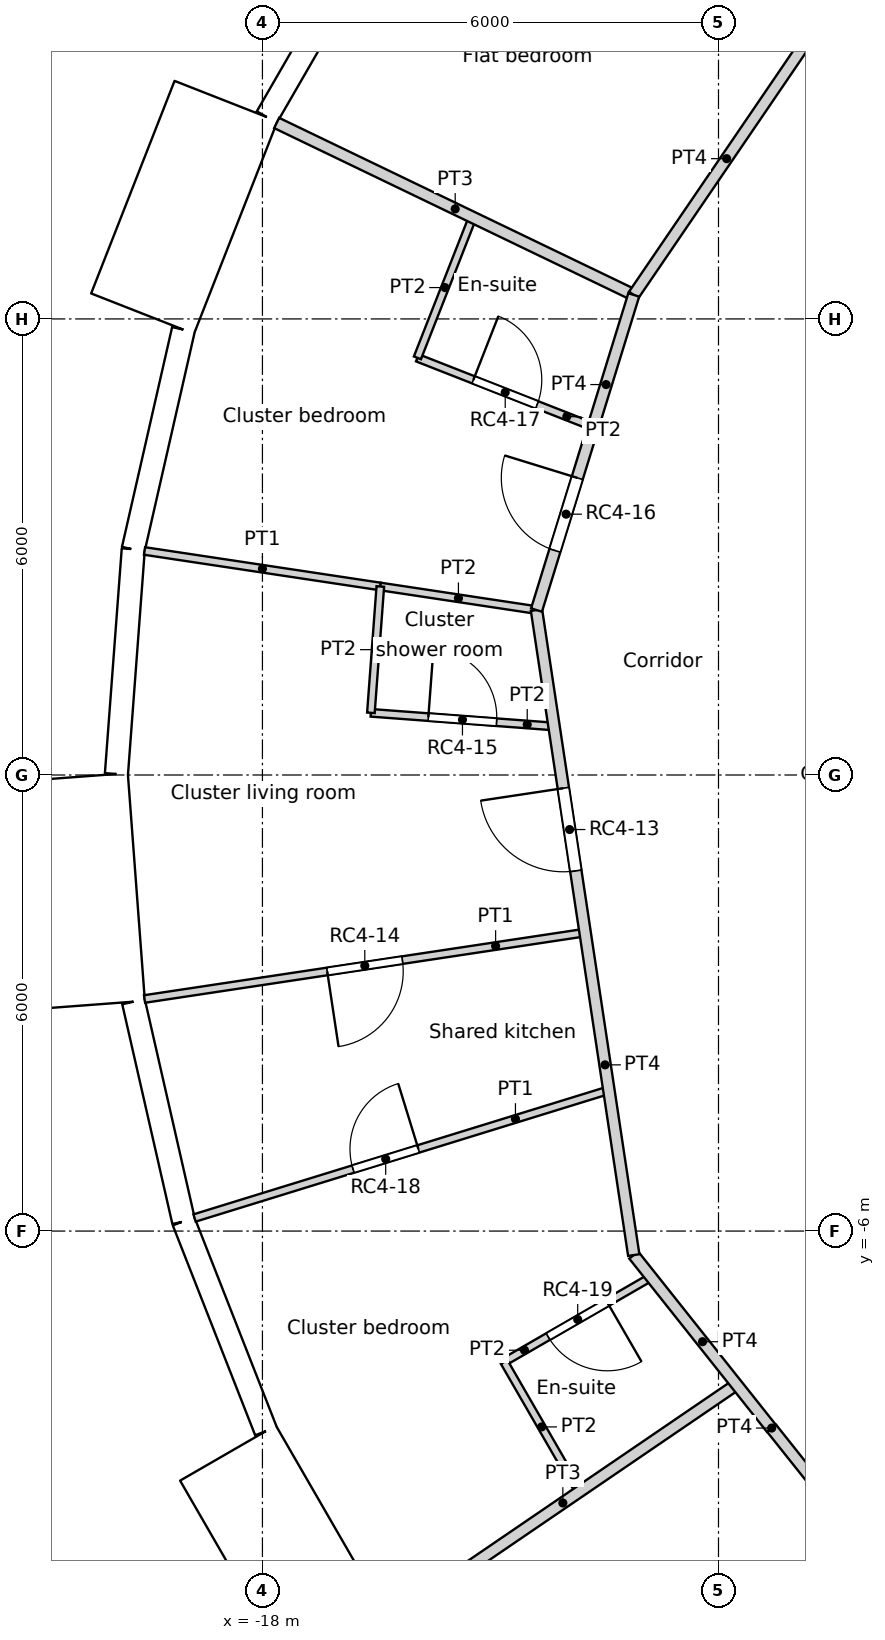
"""IFC4 building model, lengths in metres.
Left out: names, types, materials, properties, quantities, classifications, styles, units other than length and angle.
Written with IfcOpenShell. Run it as: python <this file> out.ifc"""

import sys

from ifc_helpers import new_model, si_unit, direction, frame, frame_2d, origin, origin_2d, place, context, subcontext, project, spatial, rectangle, circle, extrude, element, fill, save


model = new_model("IFC4")
c1 = context("Model", 3, precision=1e-05, world=origin(), true_north=direction((0.0, 1.0)))
c2 = subcontext(c1, "Body", "Model", "MODEL_VIEW")
j1 = project(units=[si_unit("LENGTHUNIT", "METRE"), si_unit("PLANEANGLEUNIT", "RADIAN")], contexts=[c1])
p1 = place(None, origin())
s1 = spatial("IfcSite", under=j1, at=p1, CompositionType="ELEMENT")
p2 = place(p1, origin())
s2 = spatial("IfcBuilding", under=s1, at=p2, CompositionType="ELEMENT")
p3 = place(p2, frame((0.0, 0.0, 263.4)))
s3 = spatial("IfcBuildingStorey", under=s2, at=p3, CompositionType="ELEMENT", Elevation=263.4)
for number, where, z_axis, x_axis in (
    (1, (-16.958, 8.167, 0.0), (0.0, 0.0, 1.0), (1.0, 0.0, 0.0)),
    (2, (-18.612, 2.805, 0.0), (0.0, 0.0, 1.0), (1.0, 0.0, 0.0)),
    (3, (-18.612, -2.805, 0.0), (0.0, 0.0, 1.0), (1.0, 0.0, 0.0)),
    (4, (-16.958, -8.167, 0.0), (0.0, 0.0, 1.0), (1.0, 0.0, 0.0)),
):
    element("IfcColumn", number, at=place(p3, frame(where, z_axis=z_axis, x_axis=x_axis)), inside=s3, PredefinedType="COLUMN", context=c2, shape_type="SweptSolid", body=[
        extrude(circle(Radius=0.55, at=origin_2d()), origin(), (0.0, 0.0, 1.0), 3.6),
    ])
p4 = place(p3, frame((-16.46, 11.222, 0.0), z_axis=(0.0, 0.0, 1.0), x_axis=(-0.499950756475, -0.86605383268, 0.0)))
e5 = element("IfcWall", 5, at=p4, inside=s3, PredefinedType="SOLIDWALL", context=c2, shape_type="SweptSolid", body=[
    extrude(rectangle(XDim=2.962, YDim=0.3, at=frame_2d((1.481, 0.0))), origin(), (0.0, 0.0, 1.0), 3.25),
])
p5 = place(p4, frame((1.481, 0.0, 1.55)))
e6 = element("IfcOpeningElement", 6, at=p5, cuts=e5, PredefinedType="OPENING", context=c2, shape_type="SweptSolid", body=[
    extrude(circle(Radius=0.9, at=origin_2d()), frame((0.0, 0.16, 0.0), z_axis=(0.0, -1.0, 0.0), x_axis=(1.0, 0.0, 0.0)), (0.0, 0.0, 1.0), 0.32),
])
p6 = place(p3, frame((-18.48, 8.864, -0.35), z_axis=(0.0, 0.0, 1.0), x_axis=(-0.36537792632, -0.93085926485, 0.0)))
e7 = element("IfcWall", 7, at=p6, inside=s3, PredefinedType="ELEMENTEDWALL", context=c2, shape_type="SweptSolid", body=[
    extrude(rectangle(XDim=3.0, YDim=1.45, at=frame_2d((1.5, 0.0))), origin(), (0.0, 0.0, 1.0), 3.6),
])
p7 = place(p6, frame((1.5, 0.0, 1.9)))
e8 = element("IfcOpeningElement", 8, at=p7, cuts=e7, PredefinedType="OPENING", context=c2, shape_type="SweptSolid", body=[
    extrude(circle(Radius=0.9, at=origin_2d()), frame((0.0, 0.735, 0.0), z_axis=(0.0, -1.0, 0.0), x_axis=(1.0, 0.0, 0.0)), (0.0, 0.0, 1.0), 1.47),
])
p8 = place(p3, frame((-19.04, 5.857, 0.0), z_axis=(0.0, 0.0, 1.0), x_axis=(-0.222529389789, -0.974925982155, 0.0)))
e9 = element("IfcWall", 9, at=p8, inside=s3, PredefinedType="SOLIDWALL", context=c2, shape_type="SweptSolid", body=[
    extrude(rectangle(XDim=2.962, YDim=0.3, at=frame_2d((1.481, 0.0))), origin(), (0.0, 0.0, 1.0), 3.25),
])
p9 = place(p8, frame((1.481, 0.0, 1.55)))
e10 = element("IfcOpeningElement", 10, at=p9, cuts=e9, PredefinedType="OPENING", context=c2, shape_type="SweptSolid", body=[
    extrude(circle(Radius=0.9, at=origin_2d()), frame((0.0, 0.16, 0.0), z_axis=(0.0, -1.0, 0.0), x_axis=(1.0, 0.0, 0.0)), (0.0, 0.0, 1.0), 0.32),
])
p10 = place(p3, frame((-19.699, 2.969, 0.0), z_axis=(0.0, 0.0, 1.0), x_axis=(-0.07474897196, -0.997202382263, 0.0)))
e11 = element("IfcWall", 11, at=p10, inside=s3, PredefinedType="SOLIDWALL", context=c2, shape_type="SweptSolid", body=[
    extrude(rectangle(XDim=2.962, YDim=0.3, at=frame_2d((1.481, 0.0))), origin(), (0.0, 0.0, 1.0), 3.25),
])
p11 = place(p10, frame((1.481, 0.0, 1.55)))
e12 = element("IfcOpeningElement", 12, at=p11, cuts=e11, PredefinedType="OPENING", context=c2, shape_type="SweptSolid", body=[
    extrude(circle(Radius=0.9, at=origin_2d()), frame((0.0, 0.16, 0.0), z_axis=(0.0, -1.0, 0.0), x_axis=(1.0, 0.0, 0.0)), (0.0, 0.0, 1.0), 0.32),
])
p12 = place(p3, frame((-20.496, -0.032, -0.35), z_axis=(0.0, 0.0, 1.0), x_axis=(0.074785902127, -0.997199613339, 0.0)))
e13 = element("IfcWall", 13, at=p12, inside=s3, PredefinedType="ELEMENTEDWALL", context=c2, shape_type="SweptSolid", body=[
    extrude(rectangle(XDim=3.0, YDim=1.45, at=frame_2d((1.5, 0.0))), origin(), (0.0, 0.0, 1.0), 3.6),
])
p13 = place(p12, frame((1.5, 0.0, 1.9)))
e14 = element("IfcOpeningElement", 14, at=p13, cuts=e13, PredefinedType="OPENING", context=c2, shape_type="SweptSolid", body=[
    extrude(circle(Radius=0.9, at=origin_2d()), frame((0.0, 0.735, 0.0), z_axis=(0.0, -1.0, 0.0), x_axis=(1.0, 0.0, 0.0)), (0.0, 0.0, 1.0), 1.47),
])
p14 = place(p3, frame((-19.696, -2.984, 0.0), z_axis=(0.0, 0.0, 1.0), x_axis=(0.222529389789, -0.974925982155, 0.0)))
e15 = element("IfcWall", 15, at=p14, inside=s3, PredefinedType="SOLIDWALL", context=c2, shape_type="SweptSolid", body=[
    extrude(rectangle(XDim=2.962, YDim=0.3, at=frame_2d((1.481, 0.0))), origin(), (0.0, 0.0, 1.0), 3.25),
])
p15 = place(p14, frame((1.481, 0.0, 1.55)))
e16 = element("IfcOpeningElement", 16, at=p15, cuts=e15, PredefinedType="OPENING", context=c2, shape_type="SweptSolid", body=[
    extrude(circle(Radius=0.9, at=origin_2d()), frame((0.0, 0.16, 0.0), z_axis=(0.0, -1.0, 0.0), x_axis=(1.0, 0.0, 0.0)), (0.0, 0.0, 1.0), 0.32),
])
p16 = place(p3, frame((-19.037, -5.872, 0.0), z_axis=(0.0, 0.0, 1.0), x_axis=(0.36530043032, -0.930889679612, 0.0)))
e17 = element("IfcWall", 17, at=p16, inside=s3, PredefinedType="SOLIDWALL", context=c2, shape_type="SweptSolid", body=[
    extrude(rectangle(XDim=2.962, YDim=0.3, at=frame_2d((1.481, 0.0))), origin(), (0.0, 0.0, 1.0), 3.25),
])
p17 = place(p16, frame((1.481, 0.0, 1.55)))
e18 = element("IfcOpeningElement", 18, at=p17, cuts=e17, PredefinedType="OPENING", context=c2, shape_type="SweptSolid", body=[
    extrude(circle(Radius=0.9, at=origin_2d()), frame((0.0, 0.16, 0.0), z_axis=(0.0, -1.0, 0.0), x_axis=(1.0, 0.0, 0.0)), (0.0, 0.0, 1.0), 0.32),
])
p18 = place(p3, frame((-18.452, -8.921, -0.35), z_axis=(0.0, 0.0, 1.0), x_axis=(0.499990139034, -0.866031096941, 0.0)))
e19 = element("IfcWall", 19, at=p18, inside=s3, PredefinedType="ELEMENTEDWALL", context=c2, shape_type="SweptSolid", body=[
    extrude(rectangle(XDim=3.0, YDim=1.45, at=frame_2d((1.5, 0.0))), origin(), (0.0, 0.0, 1.0), 3.6),
])
p19 = place(p18, frame((1.5, 0.0, 1.9)))
e20 = element("IfcOpeningElement", 20, at=p19, cuts=e19, PredefinedType="OPENING", context=c2, shape_type="SweptSolid", body=[
    extrude(circle(Radius=0.9, at=origin_2d()), frame((0.0, 0.735, 0.0), z_axis=(0.0, -1.0, 0.0), x_axis=(1.0, 0.0, 0.0)), (0.0, 0.0, 1.0), 1.47),
])
p20 = place(p3, frame((-11.3, -8.596, 0.0), z_axis=(0.0, 0.0, 1.0), x_axis=(0.623165080354, -0.782090328944, 0.0)))
e21 = element("IfcWall", 21, at=p20, inside=s3, PredefinedType="PARTITIONING", context=c2, shape_type="SweptSolid", body=[
    extrude(rectangle(XDim=3.564, YDim=0.15, at=frame_2d((1.782, 0.0))), origin(), (0.0, 0.0, 1.0), 3.25),
])
p21 = place(p3, frame((-11.3, -8.596, 0.0), z_axis=(0.0, 0.0, 1.0), x_axis=(0.0, 1.0, 0.0)))
e22 = element("IfcWall", 22, at=p21, inside=s3, PredefinedType="PARTITIONING", context=c2, shape_type="SweptSolid", body=[
    extrude(rectangle(XDim=0.009, YDim=0.15, at=frame_2d((0.005, 0.0))), origin(), (0.0, 0.0, 1.0), 3.25),
])
p22 = place(p3, frame((-13.115, 6.316, 0.0), z_axis=(0.0, 0.0, 1.0), x_axis=(0.563305396331, 0.826248770325, 0.0)))
e23 = element("IfcWall", 23, at=p22, inside=s3, PredefinedType="PARTITIONING", context=c2, shape_type="SweptSolid", body=[
    extrude(rectangle(XDim=4.339, YDim=0.15, at=frame_2d((2.169, 0.0))), origin(), (0.0, 0.0, 1.0), 3.25),
])
p23 = place(p3, frame((-14.394, 2.17, 0.0), z_axis=(0.0, 0.0, 1.0), x_axis=(0.149099970299, -0.988822127006, 0.0)))
e24 = element("IfcWall", 24, at=p23, inside=s3, PredefinedType="PARTITIONING", context=c2, shape_type="SweptSolid", body=[
    extrude(rectangle(XDim=8.582, YDim=0.15, at=frame_2d((4.291, 0.0))), origin(), (0.0, 0.0, 1.0), 3.25),
])
p24 = place(p23, frame((2.37, 0.0, 0.0)))
e25 = element("IfcOpeningElement", 25, at=p24, cuts=e24, PredefinedType="OPENING", context=c2, shape_type="SweptSolid", body=[
    extrude(rectangle(XDim=1.1, YDim=2.1, at=frame_2d((0.55, 1.05))), frame((0.0, 0.075, 0.0), z_axis=(0.0, -1.0, 0.0), x_axis=(1.0, 0.0, 0.0)), (0.0, 0.0, 1.0), 0.15),
])
p25 = place(p3, frame((-14.394, 2.17, 0.0), z_axis=(0.0, 0.0, 1.0), x_axis=(0.294793541578, 0.955560970239, 0.0)))
e26 = element("IfcWall", 26, at=p25, inside=s3, PredefinedType="PARTITIONING", context=c2, shape_type="SweptSolid", body=[
    extrude(rectangle(XDim=4.339, YDim=0.15, at=frame_2d((2.169, 0.0))), origin(), (0.0, 0.0, 1.0), 3.25),
])
p26 = place(p25, frame((0.82, 0.0, 0.0)))
e27 = element("IfcOpeningElement", 27, at=p26, cuts=e26, PredefinedType="OPENING", context=c2, shape_type="SweptSolid", body=[
    extrude(rectangle(XDim=1.0, YDim=2.1, at=frame_2d((0.5, 1.05))), frame((0.0, 0.075, 0.0), z_axis=(0.0, -1.0, 0.0), x_axis=(1.0, 0.0, 0.0)), (0.0, 0.0, 1.0), 0.15),
])
p27 = place(p3, frame((-13.115, -6.316, 0.0), z_axis=(0.0, 0.0, 1.0), x_axis=(0.622042479172, -0.782983495423, 0.0)))
e28 = element("IfcWall", 28, at=p27, inside=s3, PredefinedType="PARTITIONING", context=c2, shape_type="SweptSolid", body=[
    extrude(rectangle(XDim=2.911, YDim=0.15, at=frame_2d((1.456, 0.0))), origin(), (0.0, 0.0, 1.0), 3.25),
])
p28 = place(p3, frame((-17.813, 8.578, 0.0), z_axis=(0.0, 0.0, 1.0), x_axis=(0.901040981828, -0.433733961164, 0.0)))
e29 = element("IfcWall", 29, at=p28, inside=s3, PredefinedType="PARTITIONING", context=c2, shape_type="SweptSolid", body=[
    extrude(rectangle(XDim=5.214, YDim=0.15, at=frame_2d((2.607, 0.0))), origin(), (0.0, 0.0, 1.0), 3.25),
])
p29 = place(p3, frame((-19.551, -2.947, 0.0), z_axis=(0.0, 0.0, 1.0), x_axis=(0.988820879867, 0.149108241014, 0.0)))
e30 = element("IfcWall", 30, at=p29, inside=s3, PredefinedType="PARTITIONING", context=c2, shape_type="SweptSolid", body=[
    extrude(rectangle(XDim=5.862, YDim=0.1, at=frame_2d((2.931, 0.0))), origin(), (0.0, 0.0, 1.0), 3.25),
])
p30 = place(p29, frame((2.43, 0.0, 0.0)))
e31 = element("IfcOpeningElement", 31, at=p30, cuts=e30, PredefinedType="OPENING", context=c2, shape_type="SweptSolid", body=[
    extrude(rectangle(XDim=1.0, YDim=2.04, at=frame_2d((0.5, 1.02))), frame((0.0, 0.05, 0.0), z_axis=(0.0, -1.0, 0.0), x_axis=(1.0, 0.0, 0.0)), (0.0, 0.0, 1.0), 0.1),
])
p31 = place(p3, frame((-16.573, 0.818, 0.0), z_axis=(0.0, 0.0, 1.0), x_axis=(0.074422099282, 0.997226830334, 0.0)))
e32 = element("IfcWall", 32, at=p31, inside=s3, PredefinedType="PARTITIONING", context=c2, shape_type="SweptSolid", body=[
    extrude(rectangle(XDim=1.667, YDim=0.1, at=frame_2d((0.833, 0.0))), origin(), (0.0, 0.0, 1.0), 3.25),
])
p32 = place(p3, frame((-16.573, 0.818, 0.0), z_axis=(0.0, 0.0, 1.0), x_axis=(0.997216800215, -0.074556377121, 0.0)))
e33 = element("IfcWall", 33, at=p32, inside=s3, PredefinedType="PARTITIONING", context=c2, shape_type="SweptSolid", body=[
    extrude(rectangle(XDim=2.417, YDim=0.1, at=frame_2d((1.208, 0.0))), origin(), (0.0, 0.0, 1.0), 3.25),
])
p33 = place(p32, frame((0.758, 0.0, 0.0)))
e34 = element("IfcOpeningElement", 34, at=p33, cuts=e33, PredefinedType="OPENING", context=c2, shape_type="SweptSolid", body=[
    extrude(rectangle(XDim=0.9, YDim=2.0, at=frame_2d((0.45, 1.0))), frame((0.0, 0.05, 0.0), z_axis=(0.0, -1.0, 0.0), x_axis=(1.0, 0.0, 0.0)), (0.0, 0.0, 1.0), 0.1),
])
p34 = place(p3, frame((-19.551, 2.947, 0.0), z_axis=(0.0, 0.0, 1.0), x_axis=(0.98885514456, -0.14888083516, 0.0)))
e35 = element("IfcWall", 35, at=p34, inside=s3, PredefinedType="PARTITIONING", context=c2, shape_type="SweptSolid", body=[
    extrude(rectangle(XDim=3.137, YDim=0.1, at=frame_2d((1.568, 0.0))), origin(), (0.0, 0.0, 1.0), 3.25),
])
p35 = place(p3, frame((-18.893, -5.828, 0.0), z_axis=(0.0, 0.0, 1.0), x_axis=(0.955552020905, 0.294822548908, 0.0)))
e36 = element("IfcWall", 36, at=p35, inside=s3, PredefinedType="PARTITIONING", context=c2, shape_type="SweptSolid", body=[
    extrude(rectangle(XDim=5.705, YDim=0.1, at=frame_2d((2.853, 0.0))), origin(), (0.0, 0.0, 1.0), 3.25),
])
p36 = place(p35, frame((2.182, 0.0, 0.0)))
e37 = element("IfcOpeningElement", 37, at=p36, cuts=e36, PredefinedType="OPENING", context=c2, shape_type="SweptSolid", body=[
    extrude(rectangle(XDim=0.9, YDim=2.1, at=frame_2d((0.45, 1.05))), frame((0.0, 0.05, 0.0), z_axis=(0.0, -1.0, 0.0), x_axis=(1.0, 0.0, 0.0)), (0.0, 0.0, 1.0), 0.1),
])
p37 = place(p3, frame((-16.449, 2.48, 0.0), z_axis=(0.0, 0.0, 1.0), x_axis=(0.988807590235, -0.149196345444, 0.0)))
e38 = element("IfcWall", 38, at=p37, inside=s3, PredefinedType="PARTITIONING", context=c2, shape_type="SweptSolid", body=[
    extrude(rectangle(XDim=2.078, YDim=0.1, at=frame_2d((1.039, 0.0))), origin(), (0.0, 0.0, 1.0), 3.25),
])
p38 = place(p3, frame((-15.961, 5.488, 0.0), z_axis=(0.0, 0.0, 1.0), x_axis=(0.365427989951, 0.930839612479, 0.0)))
e39 = element("IfcWall", 39, at=p38, inside=s3, PredefinedType="PARTITIONING", context=c2, shape_type="SweptSolid", body=[
    extrude(rectangle(XDim=1.986, YDim=0.1, at=frame_2d((0.993, 0.0))), origin(), (0.0, 0.0, 1.0), 3.25),
])
p39 = place(p3, frame((-15.961, 5.488, 0.0), z_axis=(0.0, 0.0, 1.0), x_axis=(0.930878137474, -0.365329841614, 0.0)))
e40 = element("IfcWall", 40, at=p39, inside=s3, PredefinedType="PARTITIONING", context=c2, shape_type="SweptSolid", body=[
    extrude(rectangle(XDim=2.483, YDim=0.1, at=frame_2d((1.241, 0.0))), origin(), (0.0, 0.0, 1.0), 3.25),
])
p40 = place(p39, frame((0.791, 0.0, 0.0)))
e41 = element("IfcOpeningElement", 41, at=p40, cuts=e40, PredefinedType="OPENING", context=c2, shape_type="SweptSolid", body=[
    extrude(rectangle(XDim=0.9, YDim=2.04, at=frame_2d((0.45, 1.02))), frame((0.0, 0.05, 0.0), z_axis=(0.0, -1.0, 0.0), x_axis=(1.0, 0.0, 0.0)), (0.0, 0.0, 1.0), 0.1),
])
p41 = place(p3, frame((-14.82, -7.722, 0.0), z_axis=(0.0, 0.0, 1.0), x_axis=(0.866076416361, 0.499911633214, 0.0)))
e42 = element("IfcWall", 42, at=p41, inside=s3, PredefinedType="PARTITIONING", context=c2, shape_type="SweptSolid", body=[
    extrude(rectangle(XDim=2.234, YDim=0.1, at=frame_2d((1.117, 0.0))), origin(), (0.0, 0.0, 1.0), 3.25),
])
p42 = place(p41, frame((0.667, 0.0, 0.0)))
e43 = element("IfcOpeningElement", 43, at=p42, cuts=e42, PredefinedType="OPENING", context=c2, shape_type="SweptSolid", body=[
    extrude(rectangle(XDim=0.9, YDim=2.04, at=frame_2d((0.45, 1.02))), frame((0.0, 0.05, 0.0), z_axis=(0.0, -1.0, 0.0), x_axis=(1.0, 0.0, 0.0)), (0.0, 0.0, 1.0), 0.1),
])
p43 = place(p3, frame((-14.82, -7.722, 0.0), z_axis=(0.0, 0.0, 1.0), x_axis=(0.500143626598, -0.865942465048, 0.0)))
e44 = element("IfcWall", 44, at=p43, inside=s3, PredefinedType="PARTITIONING", context=c2, shape_type="SweptSolid", body=[
    extrude(rectangle(XDim=1.974, YDim=0.1, at=frame_2d((0.987, 0.0))), origin(), (0.0, 0.0, 1.0), 3.25),
])
p44 = place(p3, frame((-16.336, -11.138, 0.0), z_axis=(0.0, 0.0, 1.0), x_axis=(0.82615274451, 0.563446219917, 0.0)))
e45 = element("IfcWall", 45, at=p44, inside=s3, PredefinedType="PARTITIONING", context=c2, shape_type="SweptSolid", body=[
    extrude(rectangle(XDim=5.54, YDim=0.15, at=frame_2d((2.77, 0.0))), origin(), (0.0, 0.0, 1.0), 3.25),
])
p45 = place(p5, origin())
e46 = element("IfcWindow", 46, at=p45, inside=s3, PartitioningType="SINGLE_PANEL", PredefinedType="WINDOW", context=c2, shape_type="SweptSolid", body=[
    extrude(circle(Radius=0.9, at=origin_2d()), frame((0.0, 0.12, 0.0), z_axis=(0.0, -1.0, 0.0), x_axis=(1.0, 0.0, 0.0)), (0.0, 0.0, 1.0), 0.1),
])
fill(e6, e46)
p46 = place(p7, origin())
e47 = element("IfcWindow", 47, at=p46, inside=s3, PartitioningType="SINGLE_PANEL", PredefinedType="WINDOW", context=c2, shape_type="SweptSolid", body=[
    extrude(circle(Radius=0.9, at=origin_2d()), frame((0.0, 0.695, 0.0), z_axis=(0.0, -1.0, 0.0), x_axis=(1.0, 0.0, 0.0)), (0.0, 0.0, 1.0), 0.1),
])
fill(e8, e47)
p47 = place(p9, origin())
e48 = element("IfcWindow", 48, at=p47, inside=s3, PartitioningType="SINGLE_PANEL", PredefinedType="WINDOW", context=c2, shape_type="SweptSolid", body=[
    extrude(circle(Radius=0.9, at=origin_2d()), frame((0.0, 0.12, 0.0), z_axis=(0.0, -1.0, 0.0), x_axis=(1.0, 0.0, 0.0)), (0.0, 0.0, 1.0), 0.1),
])
fill(e10, e48)
p48 = place(p11, origin())
e49 = element("IfcWindow", 49, at=p48, inside=s3, PartitioningType="SINGLE_PANEL", PredefinedType="WINDOW", context=c2, shape_type="SweptSolid", body=[
    extrude(circle(Radius=0.9, at=origin_2d()), frame((0.0, 0.12, 0.0), z_axis=(0.0, -1.0, 0.0), x_axis=(1.0, 0.0, 0.0)), (0.0, 0.0, 1.0), 0.1),
])
fill(e12, e49)
p49 = place(p13, origin())
e50 = element("IfcWindow", 50, at=p49, inside=s3, PartitioningType="SINGLE_PANEL", PredefinedType="WINDOW", context=c2, shape_type="SweptSolid", body=[
    extrude(circle(Radius=0.9, at=origin_2d()), frame((0.0, 0.695, 0.0), z_axis=(0.0, -1.0, 0.0), x_axis=(1.0, 0.0, 0.0)), (0.0, 0.0, 1.0), 0.1),
])
fill(e14, e50)
p50 = place(p15, origin())
e51 = element("IfcWindow", 51, at=p50, inside=s3, PartitioningType="SINGLE_PANEL", PredefinedType="WINDOW", context=c2, shape_type="SweptSolid", body=[
    extrude(circle(Radius=0.9, at=origin_2d()), frame((0.0, 0.12, 0.0), z_axis=(0.0, -1.0, 0.0), x_axis=(1.0, 0.0, 0.0)), (0.0, 0.0, 1.0), 0.1),
])
fill(e16, e51)
p51 = place(p17, origin())
e52 = element("IfcWindow", 52, at=p51, inside=s3, PartitioningType="SINGLE_PANEL", PredefinedType="WINDOW", context=c2, shape_type="SweptSolid", body=[
    extrude(circle(Radius=0.9, at=origin_2d()), frame((0.0, 0.12, 0.0), z_axis=(0.0, -1.0, 0.0), x_axis=(1.0, 0.0, 0.0)), (0.0, 0.0, 1.0), 0.1),
])
fill(e18, e52)
p52 = place(p19, origin())
e53 = element("IfcWindow", 53, at=p52, inside=s3, PartitioningType="SINGLE_PANEL", PredefinedType="WINDOW", context=c2, shape_type="SweptSolid", body=[
    extrude(circle(Radius=0.9, at=origin_2d()), frame((0.0, 0.695, 0.0), z_axis=(0.0, -1.0, 0.0), x_axis=(1.0, 0.0, 0.0)), (0.0, 0.0, 1.0), 0.1),
])
fill(e20, e53)
p53 = place(p24, origin())
e54 = element("IfcDoor", 54, at=p53, inside=s3, OperationType="SINGLE_SWING_RIGHT", PredefinedType="DOOR", context=c2, shape_type="SweptSolid", body=[
    extrude(rectangle(XDim=1.1, YDim=2.1, at=frame_2d((0.55, 1.05))), frame((0.0, 0.025, 0.0), z_axis=(0.0, -1.0, 0.0), x_axis=(1.0, 0.0, 0.0)), (0.0, 0.0, 1.0), 0.05),
])
fill(e25, e54)
p54 = place(p30, origin())
e55 = element("IfcDoor", 55, at=p54, inside=s3, OperationType="SINGLE_SWING_RIGHT", PredefinedType="DOOR", context=c2, shape_type="SweptSolid", body=[
    extrude(rectangle(XDim=1.0, YDim=2.04, at=frame_2d((0.5, 1.02))), frame((0.0, 0.025, 0.0), z_axis=(0.0, -1.0, 0.0), x_axis=(1.0, 0.0, 0.0)), (0.0, 0.0, 1.0), 0.05),
])
fill(e31, e55)
p55 = place(p33, origin())
e56 = element("IfcDoor", 56, at=p55, inside=s3, OperationType="SINGLE_SWING_LEFT", PredefinedType="DOOR", context=c2, shape_type="SweptSolid", body=[
    extrude(rectangle(XDim=0.9, YDim=2.0, at=frame_2d((0.45, 1.0))), frame((0.0, 0.025, 0.0), z_axis=(0.0, -1.0, 0.0), x_axis=(1.0, 0.0, 0.0)), (0.0, 0.0, 1.0), 0.05),
])
fill(e34, e56)
p56 = place(p26, origin())
e57 = element("IfcDoor", 57, at=p56, inside=s3, OperationType="SINGLE_SWING_RIGHT", PredefinedType="DOOR", context=c2, shape_type="SweptSolid", body=[
    extrude(rectangle(XDim=1.0, YDim=2.1, at=frame_2d((0.5, 1.05))), frame((0.0, 0.025, 0.0), z_axis=(0.0, -1.0, 0.0), x_axis=(1.0, 0.0, 0.0)), (0.0, 0.0, 1.0), 0.05),
])
fill(e27, e57)
p57 = place(p40, origin())
e58 = element("IfcDoor", 58, at=p57, inside=s3, OperationType="SINGLE_SWING_LEFT", PredefinedType="DOOR", context=c2, shape_type="SweptSolid", body=[
    extrude(rectangle(XDim=0.9, YDim=2.04, at=frame_2d((0.45, 1.02))), frame((0.0, 0.025, 0.0), z_axis=(0.0, -1.0, 0.0), x_axis=(1.0, 0.0, 0.0)), (0.0, 0.0, 1.0), 0.05),
])
fill(e41, e58)
p58 = place(p36, origin())
e59 = element("IfcDoor", 59, at=p58, inside=s3, OperationType="SINGLE_SWING_RIGHT", PredefinedType="DOOR", context=c2, shape_type="SweptSolid", body=[
    extrude(rectangle(XDim=0.9, YDim=2.1, at=frame_2d((0.45, 1.05))), frame((0.0, 0.025, 0.0), z_axis=(0.0, -1.0, 0.0), x_axis=(1.0, 0.0, 0.0)), (0.0, 0.0, 1.0), 0.05),
])
fill(e37, e59)
p59 = place(p42, origin())
e60 = element("IfcDoor", 60, at=p59, inside=s3, OperationType="SINGLE_SWING_LEFT", PredefinedType="DOOR", context=c2, shape_type="SweptSolid", body=[
    extrude(rectangle(XDim=0.9, YDim=2.04, at=frame_2d((0.45, 1.02))), frame((0.0, 0.025, 0.0), z_axis=(0.0, -1.0, 0.0), x_axis=(1.0, 0.0, 0.0)), (0.0, 0.0, 1.0), 0.05),
])
fill(e43, e60)
save(model, sys.argv[1])
